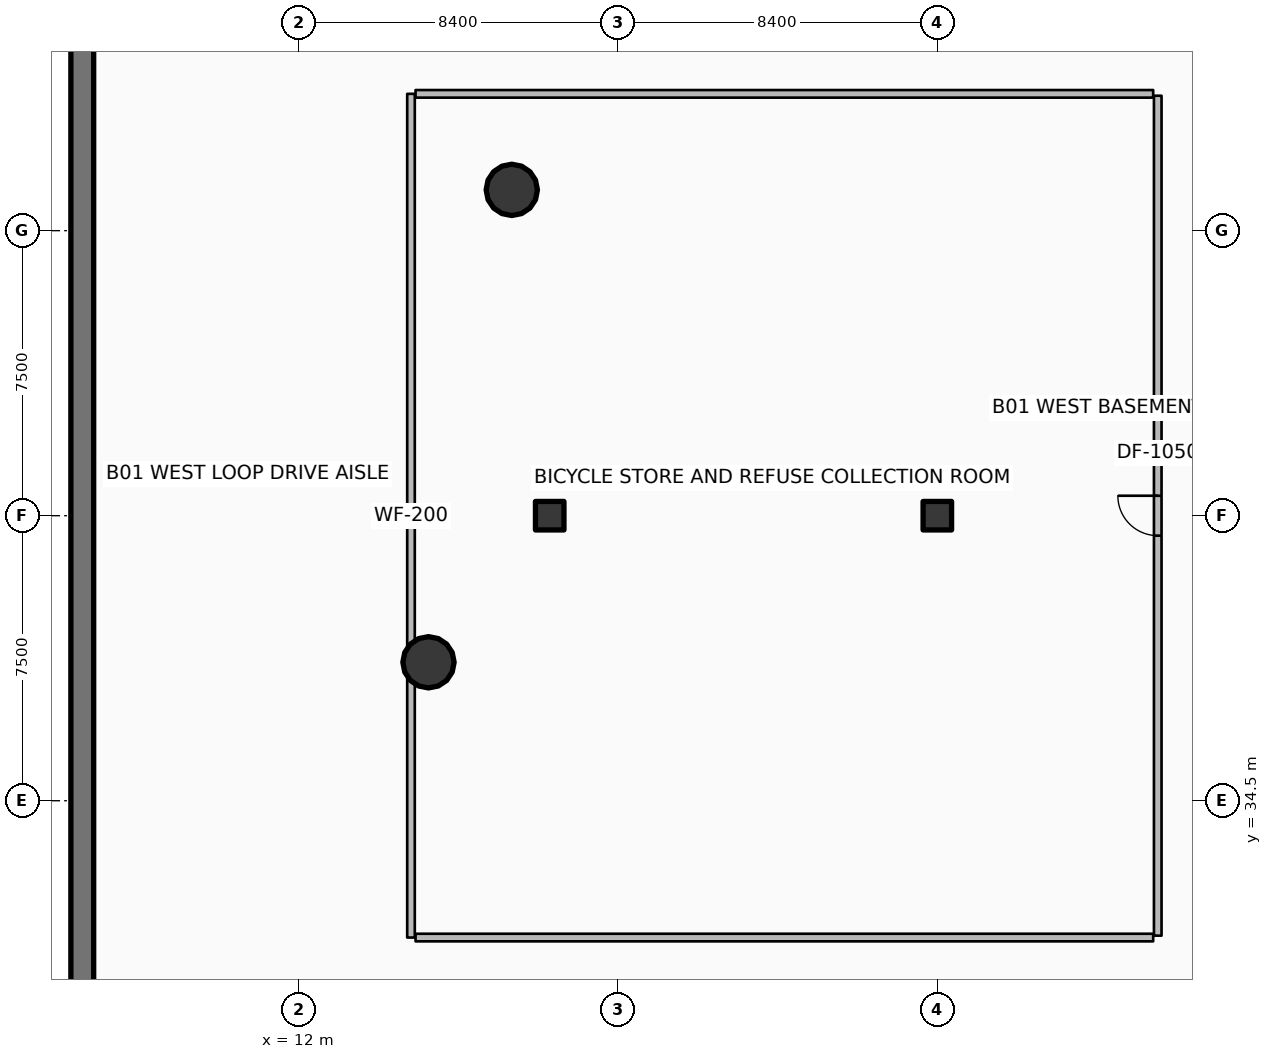
"""IFC4 building model, lengths in metres.
Left out: names, types, materials, properties, quantities, classifications, styles, units other than length and angle.
Written with IfcOpenShell. Run it as: python <this file> out.ifc"""

import sys

from ifc_helpers import new_model, si_unit, direction, frame, frame_2d, origin, origin_2d, place, context, subcontext, project, spatial, rectangle, circle, extrude, element, fill, save


model = new_model("IFC4")
c1 = context("Model", 3, precision=1e-05, world=origin(), true_north=direction((0.0, 1.0)))
c2 = subcontext(c1, "Body", "Model", "MODEL_VIEW")
j1 = project(units=[si_unit("LENGTHUNIT", "METRE"), si_unit("PLANEANGLEUNIT", "RADIAN")], contexts=[c1])
p1 = place(None, origin())
s1 = spatial("IfcSite", under=j1, at=p1, CompositionType="ELEMENT")
p2 = place(p1, origin())
s2 = spatial("IfcBuilding", under=s1, at=p2, CompositionType="ELEMENT")
p3 = place(p2, frame((0.0, 0.0, -3.8)))
s3 = spatial("IfcBuildingStorey", under=s2, at=p3, CompositionType="ELEMENT", Elevation=-3.8)
p4 = place(p3, frame((6.3, 6.6, 0.0), z_axis=(0.0, 0.0, 1.0), x_axis=(0.0, 1.0, 0.0)))
e1 = element("IfcWall", 1, at=p4, inside=s3, PredefinedType="USERDEFINED", context=c2, shape_type="SweptSolid", body=[
    extrude(rectangle(XDim=70.8, YDim=0.6, at=frame_2d((35.4, 0.0))), origin(), (0.0, 0.0, 1.0), 3.8),
])
for number, where, z_axis, x_axis in (
    (2, (18.6, 42.0, 0.0), (0.0, 0.0, 1.0), (1.0, 0.0, 0.0)),
    (3, (28.8, 42.0, 0.0), (0.0, 0.0, 1.0), (1.0, 0.0, 0.0)),
):
    element("IfcColumn", number, at=place(p3, frame(where, z_axis=z_axis, x_axis=x_axis)), inside=s3, PredefinedType="COLUMN", context=c2, shape_type="SweptSolid", body=[
        extrude(rectangle(XDim=0.75, YDim=0.75, at=origin_2d()), origin(), (0.0, 0.0, 1.0), 3.48),
    ])
for number, where, z_axis, x_axis in (
    (4, (17.602, 50.573, 0.0), (0.0, 0.0, 1.0), (1.0, 0.0, 0.0)),
    (5, (15.41, 38.143, 0.0), (0.0, 0.0, 1.0), (1.0, 0.0, 0.0)),
):
    element("IfcColumn", number, at=place(p3, frame(where, z_axis=z_axis, x_axis=x_axis)), inside=s3, PredefinedType="COLUMN", context=c2, shape_type="SweptSolid", body=[
        extrude(circle(Radius=0.675, at=origin_2d()), origin(), (0.0, 0.0, 1.0), 3.48),
    ])
p5 = place(p3, frame((14.95, 30.9, 0.0), z_axis=(0.0, 0.0, 1.0), x_axis=(0.0, 1.0, 0.0)))
e6 = element("IfcWall", 6, at=p5, inside=s3, PredefinedType="PARTITIONING", context=c2, shape_type="SweptSolid", body=[
    extrude(rectangle(XDim=22.2, YDim=0.2, at=frame_2d((11.1, 0.0))), origin(), (0.0, 0.0, 1.0), 2.92),
])
for number, where, z_axis, x_axis in (
    (7, (15.07, 53.1, 0.0), (0.0, 0.0, 1.0), (1.0, 0.0, 0.0)),
    (8, (15.07, 30.9, 0.0), (0.0, 0.0, 1.0), (1.0, 0.0, 0.0)),
):
    element("IfcWall", number, at=place(p3, frame(where, z_axis=z_axis, x_axis=x_axis)), inside=s3, PredefinedType="PARTITIONING", context=c2, shape_type="SweptSolid", body=[
        extrude(rectangle(XDim=19.41, YDim=0.2, at=frame_2d((9.705, 0.0))), origin(), (0.0, 0.0, 1.0), 2.771),
    ])
p6 = place(p3, frame((34.6, 30.95, 0.0), z_axis=(0.0, 0.0, 1.0), x_axis=(0.0, 1.0, 0.0)))
e9 = element("IfcWall", 9, at=p6, inside=s3, PredefinedType="PARTITIONING", context=c2, shape_type="SweptSolid", body=[
    extrude(rectangle(XDim=22.1, YDim=0.2, at=frame_2d((11.05, 0.0))), origin(), (0.0, 0.0, 1.0), 2.771),
])
p7 = place(p6, frame((10.525, 0.0, 0.0)))
e10 = element("IfcOpeningElement", 10, at=p7, cuts=e9, PredefinedType="OPENING", context=c2, shape_type="SweptSolid", body=[
    extrude(rectangle(XDim=1.05, YDim=2.1, at=frame_2d((0.525, 1.05))), frame((0.0, 0.11, 0.0), z_axis=(0.0, -1.0, 0.0), x_axis=(1.0, 0.0, 0.0)), (0.0, 0.0, 1.0), 0.22),
])
p8 = place(p7, origin())
e11 = element("IfcDoor", 11, at=p8, inside=s3, OperationType="SINGLE_SWING_RIGHT", PredefinedType="DOOR", context=c2, shape_type="SweptSolid", body=[
    extrude(rectangle(XDim=1.05, YDim=2.1, at=frame_2d((0.525, 1.05))), frame((0.0, 0.025, 0.0), z_axis=(0.0, -1.0, 0.0), x_axis=(1.0, 0.0, 0.0)), (0.0, 0.0, 1.0), 0.05),
])
fill(e10, e11)
save(model, sys.argv[1])
